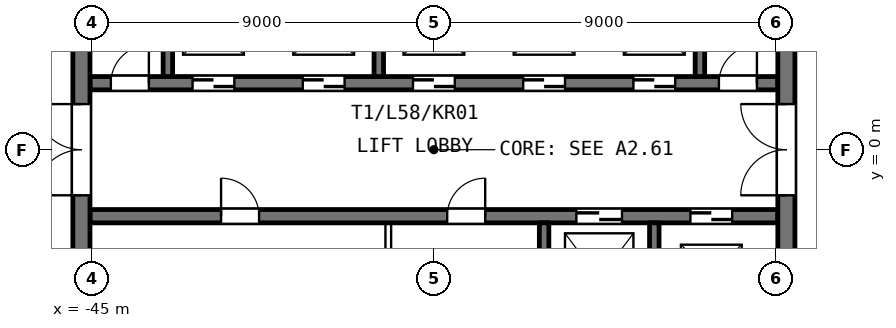
"""IFC4 building model, lengths in metres.
Left out: names, types, materials, properties, quantities, classifications, styles, units other than length and angle.
Written with IfcOpenShell. Run it as: python <this file> out.ifc"""

import sys

from ifc_helpers import new_model, si_unit, direction, frame, frame_2d, origin, place, context, subcontext, project, spatial, rectangle, extrude, element, fill, save


model = new_model("IFC4")
c1 = context("Model", 3, precision=1e-05, world=origin(), true_north=direction((0.0, 1.0)))
c2 = subcontext(c1, "Body", "Model", "MODEL_VIEW")
j1 = project(units=[si_unit("LENGTHUNIT", "METRE"), si_unit("PLANEANGLEUNIT", "RADIAN")], contexts=[c1])
p1 = place(None, origin())
s1 = spatial("IfcSite", under=j1, at=p1, CompositionType="ELEMENT")
p2 = place(p1, origin())
s2 = spatial("IfcBuilding", under=s1, at=p2, CompositionType="ELEMENT")
p3 = place(p2, frame((0.0, 0.0, 244.5)))
s3 = spatial("IfcBuildingStorey", under=s2, at=p3, CompositionType="ELEMENT", Elevation=244.5)
p4 = place(p3, frame((-45.05, -1.75, 0.0), z_axis=(0.0, 0.0, 1.0), x_axis=(1.0, 0.0, 0.0)))
e1 = element("IfcWall", 1, at=p4, inside=s3, PredefinedType="SHEAR", context=c2, shape_type="SweptSolid", body=[
    extrude(rectangle(XDim=18.1, YDim=0.35, at=frame_2d((9.05, 0.0))), origin(), (0.0, 0.0, 1.0), 3.6),
])
p5 = place(p4, frame((12.8, 0.0, 0.0)))
e2 = element("IfcOpeningElement", 2, at=p5, cuts=e1, PredefinedType="OPENING", context=c2, shape_type="SweptSolid", body=[
    extrude(rectangle(XDim=1.2, YDim=2.1, at=frame_2d((0.6, 1.05))), frame((0.0, 0.185, 0.0), z_axis=(0.0, -1.0, 0.0), x_axis=(1.0, 0.0, 0.0)), (0.0, 0.0, 1.0), 0.37),
])
p6 = place(p4, frame((15.8, 0.0, 0.0)))
e3 = element("IfcOpeningElement", 3, at=p6, cuts=e1, PredefinedType="OPENING", context=c2, shape_type="SweptSolid", body=[
    extrude(rectangle(XDim=1.1, YDim=2.1, at=frame_2d((0.55, 1.05))), frame((0.0, 0.185, 0.0), z_axis=(0.0, -1.0, 0.0), x_axis=(1.0, 0.0, 0.0)), (0.0, 0.0, 1.0), 0.37),
])
p7 = place(p4, frame((3.45, 0.0, 0.0)))
e4 = element("IfcOpeningElement", 4, at=p7, cuts=e1, PredefinedType="OPENING", context=c2, shape_type="SweptSolid", body=[
    extrude(rectangle(XDim=1.0, YDim=2.1, at=frame_2d((0.5, 1.05))), frame((0.0, 0.185, 0.0), z_axis=(0.0, -1.0, 0.0), x_axis=(1.0, 0.0, 0.0)), (0.0, 0.0, 1.0), 0.37),
])
p8 = place(p4, frame((9.4, 0.0, 0.0)))
e5 = element("IfcOpeningElement", 5, at=p8, cuts=e1, PredefinedType="OPENING", context=c2, shape_type="SweptSolid", body=[
    extrude(rectangle(XDim=1.0, YDim=2.1, at=frame_2d((0.5, 1.05))), frame((0.0, 0.185, 0.0), z_axis=(0.0, -1.0, 0.0), x_axis=(1.0, 0.0, 0.0)), (0.0, 0.0, 1.0), 0.37),
])
p9 = place(p3, frame((-45.05, 1.75, 0.0), z_axis=(0.0, 0.0, 1.0), x_axis=(1.0, 0.0, 0.0)))
e6 = element("IfcWall", 6, at=p9, inside=s3, PredefinedType="SHEAR", context=c2, shape_type="SweptSolid", body=[
    extrude(rectangle(XDim=18.1, YDim=0.35, at=frame_2d((9.05, 0.0))), origin(), (0.0, 0.0, 1.0), 3.6),
])
p10 = place(p9, frame((0.55, 0.0, 0.0)))
e7 = element("IfcOpeningElement", 7, at=p10, cuts=e6, PredefinedType="OPENING", context=c2, shape_type="SweptSolid", body=[
    extrude(rectangle(XDim=1.0, YDim=2.1, at=frame_2d((0.5, 1.05))), frame((0.0, 0.185, 0.0), z_axis=(0.0, -1.0, 0.0), x_axis=(1.0, 0.0, 0.0)), (0.0, 0.0, 1.0), 0.37),
])
p11 = place(p9, frame((2.7, 0.0, 0.0)))
e8 = element("IfcOpeningElement", 8, at=p11, cuts=e6, PredefinedType="OPENING", context=c2, shape_type="SweptSolid", body=[
    extrude(rectangle(XDim=1.1, YDim=2.1, at=frame_2d((0.55, 1.05))), frame((0.0, 0.185, 0.0), z_axis=(0.0, -1.0, 0.0), x_axis=(1.0, 0.0, 0.0)), (0.0, 0.0, 1.0), 0.37),
])
p12 = place(p9, frame((5.6, 0.0, 0.0)))
e9 = element("IfcOpeningElement", 9, at=p12, cuts=e6, PredefinedType="OPENING", context=c2, shape_type="SweptSolid", body=[
    extrude(rectangle(XDim=1.1, YDim=2.1, at=frame_2d((0.55, 1.05))), frame((0.0, 0.185, 0.0), z_axis=(0.0, -1.0, 0.0), x_axis=(1.0, 0.0, 0.0)), (0.0, 0.0, 1.0), 0.37),
])
p13 = place(p9, frame((8.5, 0.0, 0.0)))
e10 = element("IfcOpeningElement", 10, at=p13, cuts=e6, PredefinedType="OPENING", context=c2, shape_type="SweptSolid", body=[
    extrude(rectangle(XDim=1.1, YDim=2.1, at=frame_2d((0.55, 1.05))), frame((0.0, 0.185, 0.0), z_axis=(0.0, -1.0, 0.0), x_axis=(1.0, 0.0, 0.0)), (0.0, 0.0, 1.0), 0.37),
])
p14 = place(p9, frame((11.4, 0.0, 0.0)))
e11 = element("IfcOpeningElement", 11, at=p14, cuts=e6, PredefinedType="OPENING", context=c2, shape_type="SweptSolid", body=[
    extrude(rectangle(XDim=1.1, YDim=2.1, at=frame_2d((0.55, 1.05))), frame((0.0, 0.185, 0.0), z_axis=(0.0, -1.0, 0.0), x_axis=(1.0, 0.0, 0.0)), (0.0, 0.0, 1.0), 0.37),
])
p15 = place(p9, frame((14.3, 0.0, 0.0)))
e12 = element("IfcOpeningElement", 12, at=p15, cuts=e6, PredefinedType="OPENING", context=c2, shape_type="SweptSolid", body=[
    extrude(rectangle(XDim=1.1, YDim=2.1, at=frame_2d((0.55, 1.05))), frame((0.0, 0.185, 0.0), z_axis=(0.0, -1.0, 0.0), x_axis=(1.0, 0.0, 0.0)), (0.0, 0.0, 1.0), 0.37),
])
p16 = place(p9, frame((16.55, 0.0, 0.0)))
e13 = element("IfcOpeningElement", 13, at=p16, cuts=e6, PredefinedType="OPENING", context=c2, shape_type="SweptSolid", body=[
    extrude(rectangle(XDim=1.0, YDim=2.1, at=frame_2d((0.5, 1.05))), frame((0.0, 0.185, 0.0), z_axis=(0.0, -1.0, 0.0), x_axis=(1.0, 0.0, 0.0)), (0.0, 0.0, 1.0), 0.37),
])
p17 = place(p3, frame((-45.275, -9.5, 0.0), z_axis=(0.0, 0.0, 1.0), x_axis=(0.0, 1.0, 0.0)))
e14 = element("IfcWall", 14, at=p17, inside=s3, PredefinedType="SHEAR", context=c2, shape_type="SweptSolid", body=[
    extrude(rectangle(XDim=19.0, YDim=0.45, at=frame_2d((9.5, 0.0))), origin(), (0.0, 0.0, 1.0), 3.6),
])
p18 = place(p17, frame((8.3, 0.0, 0.0)))
e15 = element("IfcOpeningElement", 15, at=p18, cuts=e14, PredefinedType="OPENING", context=c2, shape_type="SweptSolid", body=[
    extrude(rectangle(XDim=2.4, YDim=2.1, at=frame_2d((1.2, 1.05))), frame((0.0, 0.235, 0.0), z_axis=(0.0, -1.0, 0.0), x_axis=(1.0, 0.0, 0.0)), (0.0, 0.0, 1.0), 0.47),
])
for number, where, z_axis, x_axis in (
    (16, (-43.0, 1.925, 0.0), (0.0, 0.0, 1.0), (0.0, 1.0, 0.0)),
    (17, (-37.45, 1.925, 0.0), (0.0, 0.0, 1.0), (0.0, 1.0, 0.0)),
):
    element("IfcWall", number, at=place(p3, frame(where, z_axis=z_axis, x_axis=x_axis)), inside=s3, PredefinedType="SHEAR", context=c2, shape_type="SweptSolid", body=[
        extrude(rectangle(XDim=2.7, YDim=0.25, at=frame_2d((1.35, 0.0))), origin(), (0.0, 0.0, 1.0), 3.6),
    ])
p19 = place(p3, frame((-37.2, -4.65, 0.0), z_axis=(0.0, 0.0, 1.0), x_axis=(0.0, 1.0, 0.0)))
e18 = element("IfcWall", 18, at=p19, inside=s3, PredefinedType="PARTITIONING", context=c2, shape_type="SweptSolid", body=[
    extrude(rectangle(XDim=2.725, YDim=0.15, at=frame_2d((1.362, 0.0))), origin(), (0.0, 0.0, 1.0), 3.6),
])
for number, where, z_axis, x_axis in (
    (19, (-33.1, -4.625, 0.0), (0.0, 0.0, 1.0), (0.0, 1.0, 0.0)),
    (20, (-30.2, -4.625, 0.0), (0.0, 0.0, 1.0), (0.0, 1.0, 0.0)),
):
    element("IfcWall", number, at=place(p3, frame(where, z_axis=z_axis, x_axis=x_axis)), inside=s3, PredefinedType="SHEAR", context=c2, shape_type="SweptSolid", body=[
        extrude(rectangle(XDim=2.7, YDim=0.25, at=frame_2d((1.35, 0.0))), origin(), (0.0, 0.0, 1.0), 3.6),
    ])
p20 = place(p3, frame((-29.0, 1.925, 0.0), z_axis=(0.0, 0.0, 1.0), x_axis=(0.0, 1.0, 0.0)))
e21 = element("IfcWall", 21, at=p20, inside=s3, PredefinedType="SHEAR", context=c2, shape_type="SweptSolid", body=[
    extrude(rectangle(XDim=2.95, YDim=0.25, at=frame_2d((1.475, 0.0))), origin(), (0.0, 0.0, 1.0), 3.6),
])
p21 = place(p3, frame((-26.725, -9.5, 0.0), z_axis=(0.0, 0.0, 1.0), x_axis=(0.0, 1.0, 0.0)))
e22 = element("IfcWall", 22, at=p21, inside=s3, PredefinedType="SHEAR", context=c2, shape_type="SweptSolid", body=[
    extrude(rectangle(XDim=19.0, YDim=0.45, at=frame_2d((9.5, 0.0))), origin(), (0.0, 0.0, 1.0), 3.6),
])
p22 = place(p21, frame((8.3, 0.0, 0.0)))
e23 = element("IfcOpeningElement", 23, at=p22, cuts=e22, PredefinedType="OPENING", context=c2, shape_type="SweptSolid", body=[
    extrude(rectangle(XDim=2.4, YDim=2.1, at=frame_2d((1.2, 1.05))), frame((0.0, 0.235, 0.0), z_axis=(0.0, -1.0, 0.0), x_axis=(1.0, 0.0, 0.0)), (0.0, 0.0, 1.0), 0.47),
])
p23 = place(p18, origin())
e24 = element("IfcDoor", 24, at=p23, inside=s3, OperationType="DOUBLE_DOOR_SINGLE_SWING", PredefinedType="DOOR", context=c2, shape_type="SweptSolid", body=[
    extrude(rectangle(XDim=2.4, YDim=2.1, at=frame_2d((1.2, 1.05))), frame((0.0, 0.025, 0.0), z_axis=(0.0, -1.0, 0.0), x_axis=(1.0, 0.0, 0.0)), (0.0, 0.0, 1.0), 0.05),
])
fill(e15, e24)
p24 = place(p22, origin())
e25 = element("IfcDoor", 25, at=p24, inside=s3, OperationType="DOUBLE_DOOR_SINGLE_SWING", PredefinedType="DOOR", context=c2, shape_type="SweptSolid", body=[
    extrude(rectangle(XDim=2.4, YDim=2.1, at=frame_2d((1.2, 1.05))), frame((0.0, 0.025, 0.0), z_axis=(0.0, -1.0, 0.0), x_axis=(1.0, 0.0, 0.0)), (0.0, 0.0, 1.0), 0.05),
])
fill(e23, e25)
p25 = place(p10, origin())
e26 = element("IfcDoor", 26, at=p25, inside=s3, OperationType="SINGLE_SWING_RIGHT", PredefinedType="DOOR", context=c2, shape_type="SweptSolid", body=[
    extrude(rectangle(XDim=1.0, YDim=2.1, at=frame_2d((0.5, 1.05))), frame((0.0, 0.025, 0.0), z_axis=(0.0, -1.0, 0.0), x_axis=(1.0, 0.0, 0.0)), (0.0, 0.0, 1.0), 0.05),
])
fill(e7, e26)
p26 = place(p11, origin())
e27 = element("IfcDoor", 27, at=p26, inside=s3, OperationType="SLIDING_TO_LEFT", PredefinedType="DOOR", context=c2, shape_type="SweptSolid", body=[
    extrude(rectangle(XDim=1.1, YDim=2.1, at=frame_2d((0.55, 1.05))), frame((0.0, 0.025, 0.0), z_axis=(0.0, -1.0, 0.0), x_axis=(1.0, 0.0, 0.0)), (0.0, 0.0, 1.0), 0.05),
])
fill(e8, e27)
p27 = place(p12, origin())
e28 = element("IfcDoor", 28, at=p27, inside=s3, OperationType="SLIDING_TO_LEFT", PredefinedType="DOOR", context=c2, shape_type="SweptSolid", body=[
    extrude(rectangle(XDim=1.1, YDim=2.1, at=frame_2d((0.55, 1.05))), frame((0.0, 0.025, 0.0), z_axis=(0.0, -1.0, 0.0), x_axis=(1.0, 0.0, 0.0)), (0.0, 0.0, 1.0), 0.05),
])
fill(e9, e28)
p28 = place(p13, origin())
e29 = element("IfcDoor", 29, at=p28, inside=s3, OperationType="SLIDING_TO_LEFT", PredefinedType="DOOR", context=c2, shape_type="SweptSolid", body=[
    extrude(rectangle(XDim=1.1, YDim=2.1, at=frame_2d((0.55, 1.05))), frame((0.0, 0.025, 0.0), z_axis=(0.0, -1.0, 0.0), x_axis=(1.0, 0.0, 0.0)), (0.0, 0.0, 1.0), 0.05),
])
fill(e10, e29)
p29 = place(p14, origin())
e30 = element("IfcDoor", 30, at=p29, inside=s3, OperationType="SLIDING_TO_LEFT", PredefinedType="DOOR", context=c2, shape_type="SweptSolid", body=[
    extrude(rectangle(XDim=1.1, YDim=2.1, at=frame_2d((0.55, 1.05))), frame((0.0, 0.025, 0.0), z_axis=(0.0, -1.0, 0.0), x_axis=(1.0, 0.0, 0.0)), (0.0, 0.0, 1.0), 0.05),
])
fill(e11, e30)
p30 = place(p15, origin())
e31 = element("IfcDoor", 31, at=p30, inside=s3, OperationType="SLIDING_TO_LEFT", PredefinedType="DOOR", context=c2, shape_type="SweptSolid", body=[
    extrude(rectangle(XDim=1.1, YDim=2.1, at=frame_2d((0.55, 1.05))), frame((0.0, 0.025, 0.0), z_axis=(0.0, -1.0, 0.0), x_axis=(1.0, 0.0, 0.0)), (0.0, 0.0, 1.0), 0.05),
])
fill(e12, e31)
p31 = place(p16, origin())
e32 = element("IfcDoor", 32, at=p31, inside=s3, OperationType="SINGLE_SWING_RIGHT", PredefinedType="DOOR", context=c2, shape_type="SweptSolid", body=[
    extrude(rectangle(XDim=1.0, YDim=2.1, at=frame_2d((0.5, 1.05))), frame((0.0, 0.025, 0.0), z_axis=(0.0, -1.0, 0.0), x_axis=(1.0, 0.0, 0.0)), (0.0, 0.0, 1.0), 0.05),
])
fill(e13, e32)
p32 = place(p5, origin())
e33 = element("IfcDoor", 33, at=p32, inside=s3, OperationType="SLIDING_TO_LEFT", PredefinedType="DOOR", context=c2, shape_type="SweptSolid", body=[
    extrude(rectangle(XDim=1.2, YDim=2.1, at=frame_2d((0.6, 1.05))), frame((0.0, 0.025, 0.0), z_axis=(0.0, -1.0, 0.0), x_axis=(1.0, 0.0, 0.0)), (0.0, 0.0, 1.0), 0.05),
])
fill(e2, e33)
p33 = place(p6, origin())
e34 = element("IfcDoor", 34, at=p33, inside=s3, OperationType="SLIDING_TO_LEFT", PredefinedType="DOOR", context=c2, shape_type="SweptSolid", body=[
    extrude(rectangle(XDim=1.1, YDim=2.1, at=frame_2d((0.55, 1.05))), frame((0.0, 0.025, 0.0), z_axis=(0.0, -1.0, 0.0), x_axis=(1.0, 0.0, 0.0)), (0.0, 0.0, 1.0), 0.05),
])
fill(e3, e34)
p34 = place(p7, origin())
e35 = element("IfcDoor", 35, at=p34, inside=s3, OperationType="SINGLE_SWING_LEFT", PredefinedType="DOOR", context=c2, shape_type="SweptSolid", body=[
    extrude(rectangle(XDim=1.0, YDim=2.1, at=frame_2d((0.5, 1.05))), frame((0.0, 0.025, 0.0), z_axis=(0.0, -1.0, 0.0), x_axis=(1.0, 0.0, 0.0)), (0.0, 0.0, 1.0), 0.05),
])
fill(e4, e35)
p35 = place(p8, origin())
e36 = element("IfcDoor", 36, at=p35, inside=s3, OperationType="SINGLE_SWING_RIGHT", PredefinedType="DOOR", context=c2, shape_type="SweptSolid", body=[
    extrude(rectangle(XDim=1.0, YDim=2.1, at=frame_2d((0.5, 1.05))), frame((0.0, 0.025, 0.0), z_axis=(0.0, -1.0, 0.0), x_axis=(1.0, 0.0, 0.0)), (0.0, 0.0, 1.0), 0.05),
])
fill(e5, e36)
save(model, sys.argv[1])
